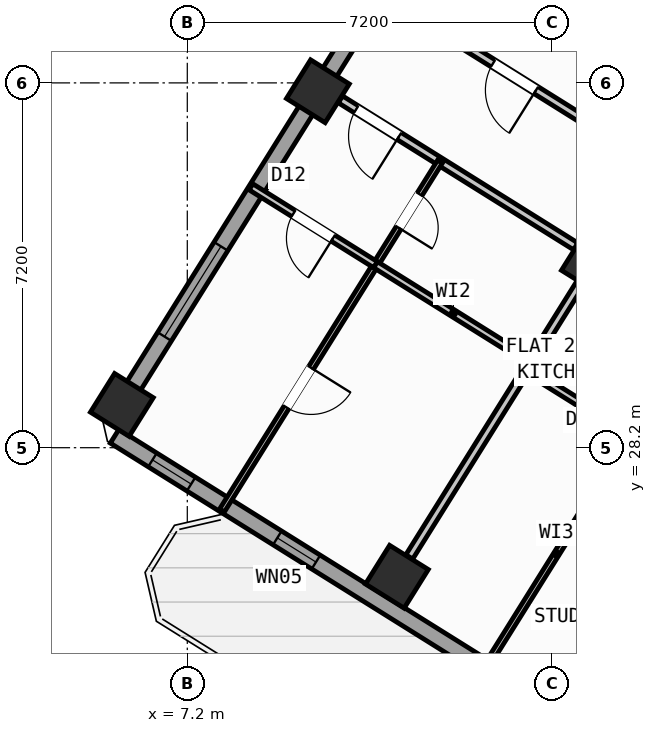
"""IFC4 building model, lengths in metres.
Left out: names, types, materials, properties, quantities, classifications, styles, units other than length and angle.
Written with IfcOpenShell. Run it as: python <this file> out.ifc"""

import sys

from ifc_helpers import new_model, si_unit, direction, frame, frame_2d, origin, origin_2d, place, context, subcontext, project, spatial, rectangle, hollow_rectangle, extrude, source, transform, mapped, element, fill, save


model = new_model("IFC4")
c1 = context("Model", 3, precision=1e-05, world=origin(), true_north=direction((0.0, 1.0)))
c2 = subcontext(c1, "Body", "Model", "MODEL_VIEW")
j1 = project(units=[si_unit("LENGTHUNIT", "METRE"), si_unit("PLANEANGLEUNIT", "RADIAN")], contexts=[c1])
p1 = place(None, origin())
s1 = spatial("IfcSite", under=j1, at=p1, CompositionType="ELEMENT")
p2 = place(p1, origin())
s2 = spatial("IfcBuilding", under=s1, at=p2, CompositionType="ELEMENT")
p3 = place(p2, frame((0.0, 0.0, 108.9)))
s3 = spatial("IfcBuildingStorey", under=s2, at=p3, CompositionType="ELEMENT", Elevation=108.9)
m1 = source(origin(), c2, "Body", "SweptSolid", [
    extrude(hollow_rectangle(XDim=0.9, YDim=0.9, WallThickness=0.036, at=origin_2d()), origin(), (0.0, 0.0, 1.0), 3.6),
])
for number, where, z_axis, x_axis in (
    (1, (15.205, 31.844, 0.0), (0.0, 0.0, 1.0), (-0.848, 0.53, 0.0)),
    (2, (11.336, 25.653, 0.0), (0.0, 0.0, 1.0), (-0.848, 0.53, 0.0)),
    (3, (9.777, 35.235, 0.0), (0.0, 0.0, 1.0), (-0.848, 0.53, 0.0)),
    (4, (5.909, 29.044, 0.0), (0.0, 0.0, 1.0), (-0.848, 0.53, 0.0)),
):
    element("IfcColumn", number, at=place(p3, frame(where, z_axis=z_axis, x_axis=x_axis)), inside=s3, PredefinedType="COLUMN", context=c2, shape_type="MappedRepresentation", body=[
        mapped(m1, transform((0.0, 0.0, 0.0), scale=1.0)),
    ])
p4 = place(p3, frame((31.76, 12.183, 0.0), z_axis=(0.0, 0.0, 1.0), x_axis=(-0.848047074256, 0.529920899612, 0.0)))
e5 = element("IfcWall", 5, at=p4, inside=s3, PredefinedType="STANDARD", context=c2, shape_type="SweptSolid", body=[
    extrude(rectangle(XDim=30.652, YDim=0.32, at=frame_2d((15.326, 0.0))), origin(), (0.0, 0.0, 1.0), 3.35),
])
p5 = place(p4, frame((15.153, 0.0, 0.0)))
e6 = element("IfcOpeningElement", 6, at=p5, cuts=e5, PredefinedType="OPENING", context=c2, shape_type="SweptSolid", body=[
    extrude(rectangle(XDim=1.2, YDim=2.15, at=frame_2d((0.6, 1.075))), frame((0.0, 0.17, 0.0), z_axis=(0.0, -1.0, 0.0), x_axis=(1.0, 0.0, 0.0)), (0.0, 0.0, 1.0), 0.34),
])
p6 = place(p4, frame((2.002, 0.0, 0.8)))
e7 = element("IfcOpeningElement", 7, at=p6, cuts=e5, PredefinedType="OPENING", context=c2, shape_type="SweptSolid", body=[
    extrude(rectangle(XDim=2.1, YDim=1.55, at=frame_2d((1.05, 0.775))), frame((0.0, 0.17, 0.0), z_axis=(0.0, -1.0, 0.0), x_axis=(1.0, 0.0, 0.0)), (0.0, 0.0, 1.0), 0.34),
])
p7 = place(p4, frame((7.206, 0.0, 0.8)))
e8 = element("IfcOpeningElement", 8, at=p7, cuts=e5, PredefinedType="OPENING", context=c2, shape_type="SweptSolid", body=[
    extrude(rectangle(XDim=2.1, YDim=1.55, at=frame_2d((1.05, 0.775))), frame((0.0, 0.17, 0.0), z_axis=(0.0, -1.0, 0.0), x_axis=(1.0, 0.0, 0.0)), (0.0, 0.0, 1.0), 0.34),
])
p8 = place(p4, frame((12.648, 0.0, 1.0)))
e9 = element("IfcOpeningElement", 9, at=p8, cuts=e5, PredefinedType="OPENING", context=c2, shape_type="SweptSolid", body=[
    extrude(rectangle(XDim=0.9, YDim=1.25, at=frame_2d((0.45, 0.625))), frame((0.0, 0.17, 0.0), z_axis=(0.0, -1.0, 0.0), x_axis=(1.0, 0.0, 0.0)), (0.0, 0.0, 1.0), 0.34),
])
p9 = place(p4, frame((19.59, 0.0, 0.95)))
e10 = element("IfcOpeningElement", 10, at=p9, cuts=e5, PredefinedType="OPENING", context=c2, shape_type="SweptSolid", body=[
    extrude(rectangle(XDim=1.2, YDim=1.4, at=frame_2d((0.6, 0.7))), frame((0.0, 0.17, 0.0), z_axis=(0.0, -1.0, 0.0), x_axis=(1.0, 0.0, 0.0)), (0.0, 0.0, 1.0), 0.34),
])
p10 = place(p4, frame((25.966, 0.0, 1.0)))
e11 = element("IfcOpeningElement", 11, at=p10, cuts=e5, PredefinedType="OPENING", context=c2, shape_type="SweptSolid", body=[
    extrude(rectangle(XDim=0.9, YDim=1.25, at=frame_2d((0.45, 0.625))), frame((0.0, 0.17, 0.0), z_axis=(0.0, -1.0, 0.0), x_axis=(1.0, 0.0, 0.0)), (0.0, 0.0, 1.0), 0.34),
])
p11 = place(p4, frame((28.871, 0.0, 1.0)))
e12 = element("IfcOpeningElement", 12, at=p11, cuts=e5, PredefinedType="OPENING", context=c2, shape_type="SweptSolid", body=[
    extrude(rectangle(XDim=0.9, YDim=1.25, at=frame_2d((0.45, 0.625))), frame((0.0, 0.17, 0.0), z_axis=(0.0, -1.0, 0.0), x_axis=(1.0, 0.0, 0.0)), (0.0, 0.0, 1.0), 0.34),
])
p12 = place(p3, frame((5.7, 28.71, 0.0), z_axis=(0.0, 0.0, 1.0), x_axis=(0.529923711467, 0.8480453172, 0.0)))
e13 = element("IfcWall", 13, at=p12, inside=s3, PredefinedType="STANDARD", context=c2, shape_type="SweptSolid", body=[
    extrude(rectangle(XDim=21.587, YDim=0.32, at=frame_2d((10.794, 0.0))), origin(), (0.0, 0.0, 1.0), 2.775),
])
p13 = place(p12, frame((1.984, 0.0, 0.8)))
e14 = element("IfcOpeningElement", 14, at=p13, cuts=e13, PredefinedType="OPENING", context=c2, shape_type="SweptSolid", body=[
    extrude(rectangle(XDim=2.1, YDim=1.55, at=frame_2d((1.05, 0.775))), frame((0.0, 0.17, 0.0), z_axis=(0.0, -1.0, 0.0), x_axis=(1.0, 0.0, 0.0)), (0.0, 0.0, 1.0), 0.34),
])
p14 = place(p12, frame((11.459, 0.0, 0.85)))
e15 = element("IfcOpeningElement", 15, at=p14, cuts=e13, PredefinedType="OPENING", context=c2, shape_type="SweptSolid", body=[
    extrude(rectangle(XDim=1.8, YDim=1.5, at=frame_2d((0.9, 0.75))), frame((0.0, 0.17, 0.0), z_axis=(0.0, -1.0, 0.0), x_axis=(1.0, 0.0, 0.0)), (0.0, 0.0, 1.0), 0.34),
])
p15 = place(p12, frame((18.335, 0.0, 0.85)))
e16 = element("IfcOpeningElement", 16, at=p15, cuts=e13, PredefinedType="OPENING", context=c2, shape_type="SweptSolid", body=[
    extrude(rectangle(XDim=1.5, YDim=1.5, at=frame_2d((0.75, 0.75))), frame((0.0, 0.17, 0.0), z_axis=(0.0, -1.0, 0.0), x_axis=(1.0, 0.0, 0.0)), (0.0, 0.0, 1.0), 0.34),
])
p16 = place(p3, frame((25.065, 28.394, 0.0), z_axis=(0.0, 0.0, 1.0), x_axis=(-0.848048310262, 0.529918921593, 0.0)))
e17 = element("IfcWall", 17, at=p16, inside=s3, PredefinedType="PARTITIONING", context=c2, shape_type="SweptSolid", body=[
    extrude(rectangle(XDim=16.73, YDim=0.16, at=frame_2d((8.365, 0.0))), origin(), (0.0, 0.0, 1.0), 3.34),
])
p17 = place(p16, frame((2.22, 0.0, 0.0)))
e18 = element("IfcOpeningElement", 18, at=p17, cuts=e17, PredefinedType="OPENING", context=c2, shape_type="SweptSolid", body=[
    extrude(rectangle(XDim=0.86, YDim=2.05, at=frame_2d((0.43, 1.025))), frame((0.0, 0.09, 0.0), z_axis=(0.0, -1.0, 0.0), x_axis=(1.0, 0.0, 0.0)), (0.0, 0.0, 1.0), 0.18),
])
p18 = place(p16, frame((7.82, 0.0, 0.0)))
e19 = element("IfcOpeningElement", 19, at=p18, cuts=e17, PredefinedType="OPENING", context=c2, shape_type="SweptSolid", body=[
    extrude(rectangle(XDim=1.0, YDim=2.1, at=frame_2d((0.5, 1.05))), frame((0.0, 0.09, 0.0), z_axis=(0.0, -1.0, 0.0), x_axis=(1.0, 0.0, 0.0)), (0.0, 0.0, 1.0), 0.18),
])
p19 = place(p16, frame((12.95, 0.0, 0.0)))
e20 = element("IfcOpeningElement", 20, at=p19, cuts=e17, PredefinedType="OPENING", context=c2, shape_type="SweptSolid", body=[
    extrude(rectangle(XDim=1.0, YDim=2.1, at=frame_2d((0.5, 1.05))), frame((0.0, 0.09, 0.0), z_axis=(0.0, -1.0, 0.0), x_axis=(1.0, 0.0, 0.0)), (0.0, 0.0, 1.0), 0.18),
])
p20 = place(p3, frame((14.866, 32.173, 0.0), z_axis=(0.0, 0.0, 1.0), x_axis=(-0.848053401719, 0.529910773464, 0.0)))
e21 = element("IfcWall", 21, at=p20, inside=s3, PredefinedType="PARTITIONING", context=c2, shape_type="SweptSolid", body=[
    extrude(rectangle(XDim=5.476, YDim=0.16, at=frame_2d((2.738, 0.0))), origin(), (0.0, 0.0, 1.0), 2.775),
])
p21 = place(p20, frame((4.108, 0.0, 0.0)))
e22 = element("IfcOpeningElement", 22, at=p21, cuts=e21, PredefinedType="OPENING", context=c2, shape_type="SweptSolid", body=[
    extrude(rectangle(XDim=1.0, YDim=2.1, at=frame_2d((0.5, 1.05))), frame((0.0, 0.09, 0.0), z_axis=(0.0, -1.0, 0.0), x_axis=(1.0, 0.0, 0.0)), (0.0, 0.0, 1.0), 0.18),
])
p22 = place(p3, frame((14.96, 31.452, 0.0), z_axis=(0.0, 0.0, 1.0), x_axis=(-0.529947310719, -0.848030570122, 0.0)))
e23 = element("IfcWall", 23, at=p22, inside=s3, PredefinedType="PARTITIONING", context=c2, shape_type="SweptSolid", body=[
    extrude(rectangle(XDim=6.376, YDim=0.16, at=frame_2d((3.188, 0.0))), origin(), (0.0, 0.0, 1.0), 2.775),
])
p23 = place(p3, frame((19.318, 26.349, 0.0), z_axis=(0.0, 0.0, 1.0), x_axis=(-0.848039019877, 0.529933789039, 0.0)))
e24 = element("IfcWall", 24, at=p23, inside=s3, PredefinedType="PLUMBINGWALL", context=c2, shape_type="SweptSolid", body=[
    extrude(rectangle(XDim=6.4, YDim=0.14, at=frame_2d((3.2, 0.0))), origin(), (0.0, 0.0, 1.0), 3.34),
])
p24 = place(p23, frame((2.824, 0.0, 0.0)))
e25 = element("IfcOpeningElement", 25, at=p24, cuts=e24, PredefinedType="OPENING", context=c2, shape_type="SweptSolid", body=[
    extrude(rectangle(XDim=0.78, YDim=2.05, at=frame_2d((0.39, 1.025))), frame((0.0, 0.08, 0.0), z_axis=(0.0, -1.0, 0.0), x_axis=(1.0, 0.0, 0.0)), (0.0, 0.0, 1.0), 0.16),
])
p25 = place(p3, frame((15.953, 28.452, 0.0), z_axis=(0.0, 0.0, 1.0), x_axis=(-0.529919714018, -0.848047815099, 0.0)))
e26 = element("IfcWall", 26, at=p25, inside=s3, PredefinedType="PARTITIONING", context=c2, shape_type="SweptSolid", body=[
    extrude(rectangle(XDim=5.54, YDim=0.11, at=frame_2d((2.77, 0.0))), origin(), (0.0, 0.0, 1.0), 3.34),
])
p26 = place(p25, frame((0.35, 0.0, 0.0)))
e27 = element("IfcOpeningElement", 27, at=p26, cuts=e26, PredefinedType="OPENING", context=c2, shape_type="SweptSolid", body=[
    extrude(rectangle(XDim=0.92, YDim=2.08, at=frame_2d((0.46, 1.04))), frame((0.0, 0.065, 0.0), z_axis=(0.0, -1.0, 0.0), x_axis=(1.0, 0.0, 0.0)), (0.0, 0.0, 1.0), 0.13),
])
p27 = place(p3, frame((12.188, 33.847, 0.0), z_axis=(0.0, 0.0, 1.0), x_axis=(-0.529917860021, -0.848048973604, 0.0)))
e28 = element("IfcWall", 28, at=p27, inside=s3, PredefinedType="PARTITIONING", context=c2, shape_type="SweptSolid", body=[
    extrude(rectangle(XDim=8.12, YDim=0.11, at=frame_2d((4.06, 0.0))), origin(), (0.0, 0.0, 1.0), 3.34),
])
p28 = place(p27, frame((0.76, 0.0, 0.0)))
e29 = element("IfcOpeningElement", 29, at=p28, cuts=e28, PredefinedType="OPENING", context=c2, shape_type="SweptSolid", body=[
    extrude(rectangle(XDim=0.78, YDim=2.05, at=frame_2d((0.39, 1.025))), frame((0.0, 0.065, 0.0), z_axis=(0.0, -1.0, 0.0), x_axis=(1.0, 0.0, 0.0)), (0.0, 0.0, 1.0), 0.13),
])
p29 = place(p27, frame((4.8, 0.0, 0.0)))
e30 = element("IfcOpeningElement", 30, at=p29, cuts=e28, PredefinedType="OPENING", context=c2, shape_type="SweptSolid", body=[
    extrude(rectangle(XDim=0.92, YDim=2.08, at=frame_2d((0.46, 1.04))), frame((0.0, 0.065, 0.0), z_axis=(0.0, -1.0, 0.0), x_axis=(1.0, 0.0, 0.0)), (0.0, 0.0, 1.0), 0.13),
])
p30 = place(p3, frame((10.916, 31.811, 0.0), z_axis=(0.0, 0.0, 1.0), x_axis=(-0.84802195137, 0.529961102341, 0.0)))
e31 = element("IfcWall", 31, at=p30, inside=s3, PredefinedType="PLUMBINGWALL", context=c2, shape_type="SweptSolid", body=[
    extrude(rectangle(XDim=2.9, YDim=0.14, at=frame_2d((1.45, 0.0))), origin(), (0.0, 0.0, 1.0), 3.34),
])
p31 = place(p30, frame((0.99, 0.0, 0.0)))
e32 = element("IfcOpeningElement", 32, at=p31, cuts=e31, PredefinedType="OPENING", context=c2, shape_type="SweptSolid", body=[
    extrude(rectangle(XDim=0.92, YDim=2.08, at=frame_2d((0.46, 1.04))), frame((0.0, 0.08, 0.0), z_axis=(0.0, -1.0, 0.0), x_axis=(1.0, 0.0, 0.0)), (0.0, 0.0, 1.0), 0.16),
])
p32 = place(p3, frame((13.986, 29.893, 0.0), z_axis=(0.0, 0.0, 1.0), x_axis=(-0.848051346257, 0.52991406295, 0.0)))
e33 = element("IfcWall", 33, at=p32, inside=s3, PredefinedType="PLUMBINGWALL", context=c2, shape_type="SweptSolid", body=[
    extrude(rectangle(XDim=3.62, YDim=0.14, at=frame_2d((1.81, 0.0))), origin(), (0.0, 0.0, 1.0), 3.34),
])
m2 = source(origin(), c2, "Body", "SweptSolid", [
    extrude(rectangle(XDim=0.9, YDim=1.25, at=frame_2d((0.45, 0.625))), frame((0.0, 0.03, 0.0), z_axis=(0.0, -1.0, 0.0), x_axis=(1.0, 0.0, 0.0)), (0.0, 0.0, 1.0), 0.06),
])
p33 = place(p10, origin())
e34 = element("IfcWindow", 34, at=p33, inside=s3, PartitioningType="SINGLE_PANEL", PredefinedType="WINDOW", context=c2, shape_type="MappedRepresentation", body=[
    mapped(m2, transform((0.0, 0.0, 0.0), scale=1.0)),
])
fill(e11, e34)
p34 = place(p11, origin())
e35 = element("IfcWindow", 35, at=p34, inside=s3, PartitioningType="SINGLE_PANEL", PredefinedType="WINDOW", context=c2, shape_type="MappedRepresentation", body=[
    mapped(m2, transform((0.0, 0.0, 0.0), scale=1.0)),
])
fill(e12, e35)
m3 = source(origin(), c2, "Body", "SweptSolid", [
    extrude(rectangle(XDim=2.1, YDim=1.55, at=frame_2d((1.05, 0.775))), frame((0.0, 0.03, 0.0), z_axis=(0.0, -1.0, 0.0), x_axis=(1.0, 0.0, 0.0)), (0.0, 0.0, 1.0), 0.06),
])
p35 = place(p13, origin())
e36 = element("IfcWindow", 36, at=p35, inside=s3, PartitioningType="SINGLE_PANEL", PredefinedType="WINDOW", context=c2, shape_type="MappedRepresentation", body=[
    mapped(m3, transform((0.0, 0.0, 0.0), scale=1.0)),
])
fill(e14, e36)
m4 = source(origin(), c2, "Body", "SweptSolid", [
    extrude(rectangle(XDim=1.0, YDim=2.1, at=frame_2d((0.5, 1.05))), frame((0.0, 0.025, 0.0), z_axis=(0.0, -1.0, 0.0), x_axis=(1.0, 0.0, 0.0)), (0.0, 0.0, 1.0), 0.05),
])
p36 = place(p21, origin())
e37 = element("IfcDoor", 37, at=p36, inside=s3, OperationType="SINGLE_SWING_LEFT", PredefinedType="DOOR", context=c2, shape_type="MappedRepresentation", body=[
    mapped(m4, transform((0.0, 0.0, 0.0), scale=1.0)),
])
fill(e22, e37)
m5 = source(origin(), c2, "Body", "SweptSolid", [
    extrude(rectangle(XDim=0.92, YDim=2.08, at=frame_2d((0.46, 1.04))), frame((0.0, 0.025, 0.0), z_axis=(0.0, -1.0, 0.0), x_axis=(1.0, 0.0, 0.0)), (0.0, 0.0, 1.0), 0.05),
])
p37 = place(p31, origin())
e38 = element("IfcDoor", 38, at=p37, inside=s3, OperationType="SINGLE_SWING_LEFT", PredefinedType="DOOR", context=c2, shape_type="MappedRepresentation", body=[
    mapped(m5, transform((0.0, 0.0, 0.0), scale=1.0)),
])
fill(e32, e38)
m6 = source(origin(), c2, "Body", "SweptSolid", [
    extrude(rectangle(XDim=0.78, YDim=2.05, at=frame_2d((0.39, 1.025))), frame((0.0, 0.025, 0.0), z_axis=(0.0, -1.0, 0.0), x_axis=(1.0, 0.0, 0.0)), (0.0, 0.0, 1.0), 0.05),
])
p38 = place(p28, origin())
e39 = element("IfcDoor", 39, at=p38, inside=s3, OperationType="SINGLE_SWING_RIGHT", PredefinedType="DOOR", context=c2, shape_type="MappedRepresentation", body=[
    mapped(m6, transform((0.0, 0.0, 0.0), scale=1.0)),
])
fill(e29, e39)
p39 = place(p29, origin())
e40 = element("IfcDoor", 40, at=p39, inside=s3, OperationType="SINGLE_SWING_LEFT", PredefinedType="DOOR", context=c2, shape_type="MappedRepresentation", body=[
    mapped(m5, transform((0.0, 0.0, 0.0), scale=1.0)),
])
fill(e30, e40)
p40 = place(p19, origin())
e41 = element("IfcDoor", 41, at=p40, inside=s3, OperationType="SINGLE_SWING_LEFT", PredefinedType="DOOR", context=c2, shape_type="MappedRepresentation", body=[
    mapped(m4, transform((0.0, 0.0, 0.0), scale=1.0)),
])
fill(e20, e41)
save(model, sys.argv[1])
